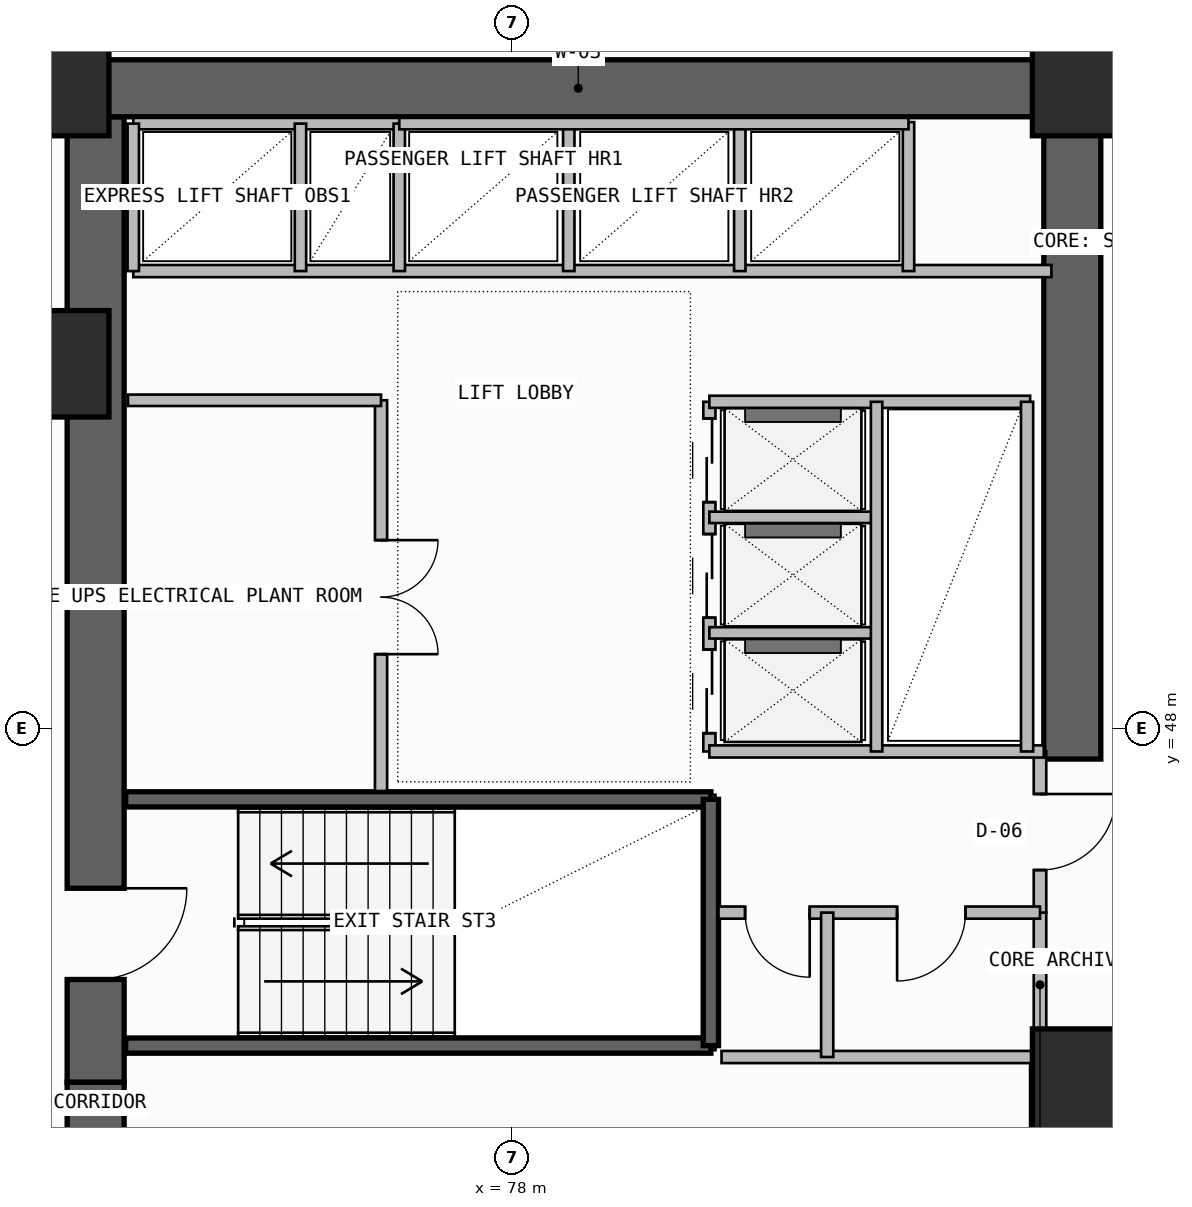
"""IFC4 building model, lengths in metres.
Left out: names, types, materials, properties, quantities, classifications, styles, units other than length and angle.
Written with IfcOpenShell. Run it as: python <this file> out.ifc"""

import sys

from ifc_helpers import new_model, si_unit, direction, frame, frame_2d, origin, origin_2d, place, context, subcontext, project, spatial, rectangle, extrude, element, fill, save


model = new_model("IFC4")
c1 = context("Model", 3, precision=1e-05, world=origin(), true_north=direction((0.0, 1.0)))
c2 = subcontext(c1, "Body", "Model", "MODEL_VIEW")
j1 = project(units=[si_unit("LENGTHUNIT", "METRE"), si_unit("PLANEANGLEUNIT", "RADIAN")], contexts=[c1])
p1 = place(None, origin())
s1 = spatial("IfcSite", under=j1, at=p1, CompositionType="ELEMENT")
p2 = place(p1, origin())
s2 = spatial("IfcBuilding", under=s1, at=p2, CompositionType="ELEMENT")
p3 = place(p2, frame((0.0, 0.0, 171.9)))
s3 = spatial("IfcBuildingStorey", under=s2, at=p3, CompositionType="ELEMENT", Elevation=171.9)
p4 = place(p3, frame((72.525, 35.5, -0.26), z_axis=(0.0, 0.0, 1.0), x_axis=(0.0, 1.0, 0.0)))
e1 = element("IfcWall", 1, at=p4, inside=s3, PredefinedType="SHEAR", context=c2, shape_type="SweptSolid", body=[
    extrude(rectangle(XDim=7.85, YDim=0.75, at=frame_2d((3.925, 0.0))), origin(), (0.0, 0.0, 1.0), 3.6),
])
p5 = place(p4, frame((1.45, 0.0, 0.26)))
e2 = element("IfcOpeningElement", 2, at=p5, cuts=e1, PredefinedType="OPENING", context=c2, shape_type="SweptSolid", body=[
    extrude(rectangle(XDim=1.2, YDim=2.2, at=frame_2d((0.6, 1.1))), frame((0.0, 0.385, 0.0), z_axis=(0.0, -1.0, 0.0), x_axis=(1.0, 0.0, 0.0)), (0.0, 0.0, 1.0), 0.77),
])
p6 = place(p3, frame((72.525, 43.35, -0.26), z_axis=(0.0, 0.0, 1.0), x_axis=(0.0, 1.0, 0.0)))
e3 = element("IfcWall", 3, at=p6, inside=s3, PredefinedType="SHEAR", context=c2, shape_type="SweptSolid", body=[
    extrude(rectangle(XDim=12.7, YDim=0.75, at=frame_2d((6.35, 0.0))), origin(), (0.0, 0.0, 1.0), 3.6),
])
p7 = place(p6, frame((1.35, 0.0, 0.26)))
e4 = element("IfcOpeningElement", 4, at=p7, cuts=e3, PredefinedType="OPENING", context=c2, shape_type="SweptSolid", body=[
    extrude(rectangle(XDim=1.2, YDim=2.2, at=frame_2d((0.6, 1.1))), frame((0.0, 0.385, 0.0), z_axis=(0.0, -1.0, 0.0), x_axis=(1.0, 0.0, 0.0)), (0.0, 0.0, 1.0), 0.77),
])
p8 = place(p3, frame((72.0, 56.425, -0.26), z_axis=(0.0, 0.0, 1.0), x_axis=(1.0, 0.0, 0.0)))
e5 = element("IfcWall", 5, at=p8, inside=s3, PredefinedType="SHEAR", context=c2, shape_type="SweptSolid", body=[
    extrude(rectangle(XDim=13.75, YDim=0.75, at=frame_2d((6.875, 0.0))), origin(), (0.0, 0.0, 1.0), 3.6),
])
p9 = place(p3, frame((85.375, 47.6, -0.26), z_axis=(0.0, 0.0, 1.0), x_axis=(0.0, 1.0, 0.0)))
e6 = element("IfcWall", 6, at=p9, inside=s3, PredefinedType="SHEAR", context=c2, shape_type="SweptSolid", body=[
    extrude(rectangle(XDim=8.45, YDim=0.75, at=frame_2d((4.225, 0.0))), origin(), (0.0, 0.0, 1.0), 3.6),
])
for number, where, z_axis, x_axis in (
    (7, (85.55, 43.35, 0.0), (0.0, 0.0, 1.0), (1.0, 0.0, 0.0)),
    (8, (72.0, 52.8, 0.0), (0.0, 0.0, 1.0), (1.0, 0.0, 0.0)),
    (9, (72.0, 56.5, 0.0), (0.0, 0.0, 1.0), (1.0, 0.0, 0.0)),
    (10, (85.55, 56.5, 0.0), (0.0, 0.0, 1.0), (1.0, 0.0, 0.0)),
):
    element("IfcColumn", number, at=place(p3, frame(where, z_axis=z_axis, x_axis=x_axis)), inside=s3, PredefinedType="COLUMN", context=c2, shape_type="SweptSolid", body=[
        extrude(rectangle(XDim=1.4, YDim=1.4, at=origin_2d()), origin(), (0.0, 0.0, 1.0), 3.6),
    ])
p10 = place(p3, frame((84.92, 38.85, 0.0), z_axis=(0.0, 0.0, 1.0), x_axis=(0.0, 1.0, 0.0)))
e11 = element("IfcWall", 11, at=p10, inside=s3, PredefinedType="SOLIDWALL", context=c2, shape_type="SweptSolid", body=[
    extrude(rectangle(XDim=4.83, YDim=0.2, at=frame_2d((2.415, 0.0))), origin(), (0.0, 0.0, 1.0), 3.34),
])
p11 = place(p10, frame((1.25, 0.0, 0.0)))
e12 = element("IfcOpeningElement", 12, at=p11, cuts=e11, PredefinedType="OPENING", context=c2, shape_type="SweptSolid", body=[
    extrude(rectangle(XDim=1.1, YDim=2.2, at=frame_2d((0.55, 1.1))), frame((0.0, 0.11, 0.0), z_axis=(0.0, -1.0, 0.0), x_axis=(1.0, 0.0, 0.0)), (0.0, 0.0, 1.0), 0.22),
])
for number, where, z_axis, x_axis in (
    (13, (72.92, 43.83, -0.26), (0.0, 0.0, 1.0), (1.0, 0.0, 0.0)),
    (14, (72.92, 47.07, -0.26), (0.0, 0.0, 1.0), (1.0, 0.0, 0.0)),
):
    element("IfcWall", number, at=place(p3, frame(where, z_axis=z_axis, x_axis=x_axis)), inside=s3, PredefinedType="SOLIDWALL", context=c2, shape_type="SweptSolid", body=[
        extrude(rectangle(XDim=7.7, YDim=0.2, at=frame_2d((3.85, 0.0))), origin(), (0.0, 0.0, 1.0), 3.6),
    ])
p12 = place(p3, frame((80.62, 43.83, -0.26), z_axis=(0.0, 0.0, 1.0), x_axis=(0.0, 1.0, 0.0)))
e15 = element("IfcWall", 15, at=p12, inside=s3, PredefinedType="SOLIDWALL", context=c2, shape_type="SweptSolid", body=[
    extrude(rectangle(XDim=3.24, YDim=0.2, at=frame_2d((1.62, 0.0))), origin(), (0.0, 0.0, 1.0), 3.6),
])
p13 = place(p3, frame((84.95, 43.68, 0.0), z_axis=(0.0, 0.0, 1.0), x_axis=(0.0, 1.0, 0.0)))
e16 = element("IfcWall", 16, at=p13, inside=s3, PredefinedType="PLUMBINGWALL", context=c2, shape_type="SweptSolid", body=[
    extrude(rectangle(XDim=1.9, YDim=0.165, at=frame_2d((0.95, 0.0))), origin(), (0.0, 0.0, 1.0), 3.34),
])
p14 = place(p3, frame((84.95, 45.58, 0.0), z_axis=(0.0, 0.0, 1.0), x_axis=(0.0, 1.0, 0.0)))
e17 = element("IfcWall", 17, at=p14, inside=s3, PredefinedType="PARTITIONING", context=c2, shape_type="SweptSolid", body=[
    extrude(rectangle(XDim=2.12, YDim=0.165, at=frame_2d((1.06, 0.0))), origin(), (0.0, 0.0, 1.0), 3.34),
])
p15 = place(p14, frame((0.56, 0.0, 0.0)))
e18 = element("IfcOpeningElement", 18, at=p15, cuts=e17, PredefinedType="OPENING", context=c2, shape_type="SweptSolid", body=[
    extrude(rectangle(XDim=1.0, YDim=2.2, at=frame_2d((0.5, 1.1))), frame((0.0, 0.093, 0.0), z_axis=(0.0, -1.0, 0.0), x_axis=(1.0, 0.0, 0.0)), (0.0, 0.0, 1.0), 0.185),
])
p16 = place(p3, frame((80.72, 45.58, 0.0), z_axis=(0.0, 0.0, 1.0), x_axis=(1.0, 0.0, 0.0)))
e19 = element("IfcWall", 19, at=p16, inside=s3, PredefinedType="PLUMBINGWALL", context=c2, shape_type="SweptSolid", body=[
    extrude(rectangle(XDim=4.23, YDim=0.16, at=frame_2d((2.115, 0.0))), origin(), (0.0, 0.0, 1.0), 3.34),
])
p17 = place(p16, frame((0.35, 0.0, 0.0)))
e20 = element("IfcOpeningElement", 20, at=p17, cuts=e19, PredefinedType="OPENING", context=c2, shape_type="SweptSolid", body=[
    extrude(rectangle(XDim=0.85, YDim=2.05, at=frame_2d((0.425, 1.025))), frame((0.0, 0.09, 0.0), z_axis=(0.0, -1.0, 0.0), x_axis=(1.0, 0.0, 0.0)), (0.0, 0.0, 1.0), 0.18),
])
p18 = place(p16, frame((2.35, 0.0, 0.0)))
e21 = element("IfcOpeningElement", 21, at=p18, cuts=e19, PredefinedType="OPENING", context=c2, shape_type="SweptSolid", body=[
    extrude(rectangle(XDim=0.9, YDim=2.1, at=frame_2d((0.45, 1.05))), frame((0.0, 0.09, 0.0), z_axis=(0.0, -1.0, 0.0), x_axis=(1.0, 0.0, 0.0)), (0.0, 0.0, 1.0), 0.18),
])
p19 = place(p3, frame((80.76, 43.68, 0.0), z_axis=(0.0, 0.0, 1.0), x_axis=(1.0, 0.0, 0.0)))
e22 = element("IfcWall", 22, at=p19, inside=s3, PredefinedType="PLUMBINGWALL", context=c2, shape_type="SweptSolid", body=[
    extrude(rectangle(XDim=4.19, YDim=0.16, at=frame_2d((2.095, 0.0))), origin(), (0.0, 0.0, 1.0), 3.34),
])
p20 = place(p3, frame((82.15, 43.68, 0.0), z_axis=(0.0, 0.0, 1.0), x_axis=(0.0, 1.0, 0.0)))
e23 = element("IfcWall", 23, at=p20, inside=s3, PredefinedType="PLUMBINGWALL", context=c2, shape_type="SweptSolid", body=[
    extrude(rectangle(XDim=1.9, YDim=0.16, at=frame_2d((0.95, 0.0))), origin(), (0.0, 0.0, 1.0), 3.34),
])
p21 = place(p3, frame((76.28, 47.18, 0.0), z_axis=(0.0, 0.0, 1.0), x_axis=(0.0, 1.0, 0.0)))
e24 = element("IfcWall", 24, at=p21, inside=s3, PredefinedType="SOLIDWALL", context=c2, shape_type="SweptSolid", body=[
    extrude(rectangle(XDim=5.14, YDim=0.16, at=frame_2d((2.57, 0.0))), origin(), (0.0, 0.0, 1.0), 3.34),
])
p22 = place(p21, frame((1.8, 0.0, 0.0)))
e25 = element("IfcOpeningElement", 25, at=p22, cuts=e24, PredefinedType="OPENING", context=c2, shape_type="SweptSolid", body=[
    extrude(rectangle(XDim=1.5, YDim=2.25, at=frame_2d((0.75, 1.125))), frame((0.0, 0.09, 0.0), z_axis=(0.0, -1.0, 0.0), x_axis=(1.0, 0.0, 0.0)), (0.0, 0.0, 1.0), 0.18),
])
p23 = place(p3, frame((72.95, 52.32, 0.0), z_axis=(0.0, 0.0, 1.0), x_axis=(1.0, 0.0, 0.0)))
e26 = element("IfcWall", 26, at=p23, inside=s3, PredefinedType="SOLIDWALL", context=c2, shape_type="SweptSolid", body=[
    extrude(rectangle(XDim=3.33, YDim=0.15, at=frame_2d((1.665, 0.0))), origin(), (0.0, 0.0, 1.0), 3.34),
])
p24 = place(p3, frame((80.6, 47.7, 0.0), z_axis=(0.0, 0.0, 1.0), x_axis=(0.0, 1.0, 0.0)))
e27 = element("IfcWall", 27, at=p24, inside=s3, PredefinedType="SOLIDWALL", context=c2, shape_type="SweptSolid", body=[
    extrude(rectangle(XDim=4.6, YDim=0.16, at=frame_2d((2.3, 0.0))), origin(), (0.0, 0.0, 1.0), 3.34),
])
p25 = place(p24, frame((0.24, 0.0, 0.0)))
e28 = element("IfcOpeningElement", 28, at=p25, cuts=e27, PredefinedType="OPENING", context=c2, shape_type="SweptSolid", body=[
    extrude(rectangle(XDim=1.1, YDim=2.25, at=frame_2d((0.55, 1.125))), frame((0.0, 0.09, 0.0), z_axis=(0.0, -1.0, 0.0), x_axis=(1.0, 0.0, 0.0)), (0.0, 0.0, 1.0), 0.18),
])
p26 = place(p24, frame((1.76, 0.0, 0.0)))
e29 = element("IfcOpeningElement", 29, at=p26, cuts=e27, PredefinedType="OPENING", context=c2, shape_type="SweptSolid", body=[
    extrude(rectangle(XDim=1.1, YDim=2.25, at=frame_2d((0.55, 1.125))), frame((0.0, 0.09, 0.0), z_axis=(0.0, -1.0, 0.0), x_axis=(1.0, 0.0, 0.0)), (0.0, 0.0, 1.0), 0.18),
])
p27 = place(p24, frame((3.28, 0.0, 0.0)))
e30 = element("IfcOpeningElement", 30, at=p27, cuts=e27, PredefinedType="OPENING", context=c2, shape_type="SweptSolid", body=[
    extrude(rectangle(XDim=1.1, YDim=2.25, at=frame_2d((0.55, 1.125))), frame((0.0, 0.09, 0.0), z_axis=(0.0, -1.0, 0.0), x_axis=(1.0, 0.0, 0.0)), (0.0, 0.0, 1.0), 0.18),
])
p28 = place(p3, frame((80.6, 47.7, 0.0), z_axis=(0.0, 0.0, 1.0), x_axis=(1.0, 0.0, 0.0)))
e31 = element("IfcWall", 31, at=p28, inside=s3, PredefinedType="SOLIDWALL", context=c2, shape_type="SweptSolid", body=[
    extrude(rectangle(XDim=4.4, YDim=0.16, at=frame_2d((2.2, 0.0))), origin(), (0.0, 0.0, 1.0), 3.34),
])
p29 = place(p3, frame((80.6, 52.3, 0.0), z_axis=(0.0, 0.0, 1.0), x_axis=(1.0, 0.0, 0.0)))
e32 = element("IfcWall", 32, at=p29, inside=s3, PredefinedType="SOLIDWALL", context=c2, shape_type="SweptSolid", body=[
    extrude(rectangle(XDim=4.22, YDim=0.16, at=frame_2d((2.11, 0.0))), origin(), (0.0, 0.0, 1.0), 3.34),
])
for number, where, z_axis, x_axis in (
    (33, (80.6, 49.26, 0.0), (0.0, 0.0, 1.0), (1.0, 0.0, 0.0)),
    (34, (80.6, 50.78, 0.0), (0.0, 0.0, 1.0), (1.0, 0.0, 0.0)),
):
    element("IfcWall", number, at=place(p3, frame(where, z_axis=z_axis, x_axis=x_axis)), inside=s3, PredefinedType="PLUMBINGWALL", context=c2, shape_type="SweptSolid", body=[
        extrude(rectangle(XDim=2.2, YDim=0.15, at=frame_2d((1.1, 0.0))), origin(), (0.0, 0.0, 1.0), 3.34),
    ])
p30 = place(p3, frame((82.8, 47.7, 0.0), z_axis=(0.0, 0.0, 1.0), x_axis=(0.0, 1.0, 0.0)))
e35 = element("IfcWall", 35, at=p30, inside=s3, PredefinedType="PLUMBINGWALL", context=c2, shape_type="SweptSolid", body=[
    extrude(rectangle(XDim=4.6, YDim=0.15, at=frame_2d((2.3, 0.0))), origin(), (0.0, 0.0, 1.0), 3.34),
])
p31 = place(p3, frame((84.78, 47.7, 0.0), z_axis=(0.0, 0.0, 1.0), x_axis=(0.0, 1.0, 0.0)))
e36 = element("IfcWall", 36, at=p31, inside=s3, PredefinedType="SOLIDWALL", context=c2, shape_type="SweptSolid", body=[
    extrude(rectangle(XDim=4.6, YDim=0.16, at=frame_2d((2.3, 0.0))), origin(), (0.0, 0.0, 1.0), 3.34),
])
p32 = place(p3, frame((73.02, 54.02, 0.0), z_axis=(0.0, 0.0, 1.0), x_axis=(1.0, 0.0, 0.0)))
e37 = element("IfcWall", 37, at=p32, inside=s3, PredefinedType="SOLIDWALL", context=c2, shape_type="SweptSolid", body=[
    extrude(rectangle(XDim=12.08, YDim=0.16, at=frame_2d((6.04, 0.0))), origin(), (0.0, 0.0, 1.0), 3.34),
])
p33 = place(p3, frame((73.02, 55.96, 0.0), z_axis=(0.0, 0.0, 1.0), x_axis=(1.0, 0.0, 0.0)))
e38 = element("IfcWall", 38, at=p33, inside=s3, PredefinedType="SOLIDWALL", context=c2, shape_type="SweptSolid", body=[
    extrude(rectangle(XDim=3.5, YDim=0.15, at=frame_2d((1.75, 0.0))), origin(), (0.0, 0.0, 1.0), 3.34),
])
p34 = place(p3, frame((73.02, 54.02, 0.0), z_axis=(0.0, 0.0, 1.0), x_axis=(0.0, 1.0, 0.0)))
e39 = element("IfcWall", 39, at=p34, inside=s3, PredefinedType="PLUMBINGWALL", context=c2, shape_type="SweptSolid", body=[
    extrude(rectangle(XDim=1.94, YDim=0.15, at=frame_2d((0.97, 0.0))), origin(), (0.0, 0.0, 1.0), 3.34),
])
p35 = place(p3, frame((76.52, 54.02, 0.0), z_axis=(0.0, 0.0, 1.0), x_axis=(0.0, 1.0, 0.0)))
e40 = element("IfcWall", 40, at=p35, inside=s3, PredefinedType="SOLIDWALL", context=c2, shape_type="SweptSolid", body=[
    extrude(rectangle(XDim=1.94, YDim=0.15, at=frame_2d((0.97, 0.0))), origin(), (0.0, 0.0, 1.0), 3.34),
])
p36 = place(p3, frame((75.22, 54.02, 0.0), z_axis=(0.0, 0.0, 1.0), x_axis=(0.0, 1.0, 0.0)))
e41 = element("IfcWall", 41, at=p36, inside=s3, PredefinedType="PLUMBINGWALL", context=c2, shape_type="SweptSolid", body=[
    extrude(rectangle(XDim=1.94, YDim=0.15, at=frame_2d((0.97, 0.0))), origin(), (0.0, 0.0, 1.0), 3.34),
])
for number, where, z_axis, x_axis in (
    (42, (78.75, 54.02, 0.0), (0.0, 0.0, 1.0), (0.0, 1.0, 0.0)),
    (43, (81.0, 54.02, 0.0), (0.0, 0.0, 1.0), (0.0, 1.0, 0.0)),
):
    element("IfcWall", number, at=place(p3, frame(where, z_axis=z_axis, x_axis=x_axis)), inside=s3, PredefinedType="PLUMBINGWALL", context=c2, shape_type="SweptSolid", body=[
        extrude(rectangle(XDim=1.96, YDim=0.15, at=frame_2d((0.98, 0.0))), origin(), (0.0, 0.0, 1.0), 3.34),
    ])
p37 = place(p3, frame((83.22, 54.02, 0.0), z_axis=(0.0, 0.0, 1.0), x_axis=(0.0, 1.0, 0.0)))
e44 = element("IfcWall", 44, at=p37, inside=s3, PredefinedType="SOLIDWALL", context=c2, shape_type="SweptSolid", body=[
    extrude(rectangle(XDim=1.96, YDim=0.15, at=frame_2d((0.98, 0.0))), origin(), (0.0, 0.0, 1.0), 3.34),
])
p38 = place(p3, frame((76.52, 55.96, 0.0), z_axis=(0.0, 0.0, 1.0), x_axis=(1.0, 0.0, 0.0)))
e45 = element("IfcWall", 45, at=p38, inside=s3, PredefinedType="SOLIDWALL", context=c2, shape_type="SweptSolid", body=[
    extrude(rectangle(XDim=6.7, YDim=0.15, at=frame_2d((3.35, 0.0))), origin(), (0.0, 0.0, 1.0), 3.34),
])
p39 = place(p7, frame((1.2, 0.0, 0.0), z_axis=(0.0, 0.0, 1.0), x_axis=(-1.0, 0.0, 0.0)))
e46 = element("IfcDoor", 46, at=p39, inside=s3, OperationType="SINGLE_SWING_LEFT", PredefinedType="USERDEFINED", context=c2, shape_type="SweptSolid", body=[
    extrude(rectangle(XDim=1.2, YDim=2.2, at=frame_2d((0.6, 1.1))), frame((0.0, 0.025, 0.0), z_axis=(0.0, -1.0, 0.0), x_axis=(1.0, 0.0, 0.0)), (0.0, 0.0, 1.0), 0.05),
])
fill(e4, e46)
p40 = place(p15, frame((1.0, 0.0, 0.0), z_axis=(0.0, 0.0, 1.0), x_axis=(-1.0, 0.0, 0.0)))
e47 = element("IfcDoor", 47, at=p40, inside=s3, OperationType="SINGLE_SWING_LEFT", PredefinedType="DOOR", context=c2, shape_type="SweptSolid", body=[
    extrude(rectangle(XDim=1.0, YDim=2.2, at=frame_2d((0.5, 1.1))), frame((0.0, 0.025, 0.0), z_axis=(0.0, -1.0, 0.0), x_axis=(1.0, 0.0, 0.0)), (0.0, 0.0, 1.0), 0.05),
])
fill(e18, e47)
p41 = place(p17, frame((0.85, 0.0, 0.0), z_axis=(0.0, 0.0, 1.0), x_axis=(-1.0, 0.0, 0.0)))
e48 = element("IfcDoor", 48, at=p41, inside=s3, OperationType="SINGLE_SWING_LEFT", PredefinedType="DOOR", context=c2, shape_type="SweptSolid", body=[
    extrude(rectangle(XDim=0.85, YDim=2.05, at=frame_2d((0.425, 1.025))), frame((0.0, 0.025, 0.0), z_axis=(0.0, -1.0, 0.0), x_axis=(1.0, 0.0, 0.0)), (0.0, 0.0, 1.0), 0.05),
])
fill(e20, e48)
p42 = place(p18, frame((0.9, 0.0, 0.0), z_axis=(0.0, 0.0, 1.0), x_axis=(-1.0, 0.0, 0.0)))
e49 = element("IfcDoor", 49, at=p42, inside=s3, OperationType="SINGLE_SWING_RIGHT", PredefinedType="DOOR", context=c2, shape_type="SweptSolid", body=[
    extrude(rectangle(XDim=0.9, YDim=2.1, at=frame_2d((0.45, 1.05))), frame((0.0, 0.025, 0.0), z_axis=(0.0, -1.0, 0.0), x_axis=(1.0, 0.0, 0.0)), (0.0, 0.0, 1.0), 0.05),
])
fill(e21, e49)
p43 = place(p22, frame((1.5, 0.0, 0.0), z_axis=(0.0, 0.0, 1.0), x_axis=(-1.0, 0.0, 0.0)))
e50 = element("IfcDoor", 50, at=p43, inside=s3, OperationType="DOUBLE_DOOR_SINGLE_SWING", PredefinedType="DOOR", context=c2, shape_type="SweptSolid", body=[
    extrude(rectangle(XDim=1.5, YDim=2.25, at=frame_2d((0.75, 1.125))), frame((0.0, 0.025, 0.0), z_axis=(0.0, -1.0, 0.0), x_axis=(1.0, 0.0, 0.0)), (0.0, 0.0, 1.0), 0.05),
])
fill(e25, e50)
p44 = place(p25, frame((1.1, 0.0, 0.0), z_axis=(0.0, 0.0, 1.0), x_axis=(-1.0, 0.0, 0.0)))
e51 = element("IfcDoor", 51, at=p44, inside=s3, OperationType="DOUBLE_DOOR_SLIDING", PredefinedType="DOOR", context=c2, shape_type="SweptSolid", body=[
    extrude(rectangle(XDim=1.1, YDim=2.25, at=frame_2d((0.55, 1.125))), frame((0.0, 0.025, 0.0), z_axis=(0.0, -1.0, 0.0), x_axis=(1.0, 0.0, 0.0)), (0.0, 0.0, 1.0), 0.05),
])
fill(e28, e51)
p45 = place(p26, frame((1.1, 0.0, 0.0), z_axis=(0.0, 0.0, 1.0), x_axis=(-1.0, 0.0, 0.0)))
e52 = element("IfcDoor", 52, at=p45, inside=s3, OperationType="DOUBLE_DOOR_SLIDING", PredefinedType="DOOR", context=c2, shape_type="SweptSolid", body=[
    extrude(rectangle(XDim=1.1, YDim=2.25, at=frame_2d((0.55, 1.125))), frame((0.0, 0.025, 0.0), z_axis=(0.0, -1.0, 0.0), x_axis=(1.0, 0.0, 0.0)), (0.0, 0.0, 1.0), 0.05),
])
fill(e29, e52)
p46 = place(p27, frame((1.1, 0.0, 0.0), z_axis=(0.0, 0.0, 1.0), x_axis=(-1.0, 0.0, 0.0)))
e53 = element("IfcDoor", 53, at=p46, inside=s3, OperationType="DOUBLE_DOOR_SLIDING", PredefinedType="DOOR", context=c2, shape_type="SweptSolid", body=[
    extrude(rectangle(XDim=1.1, YDim=2.25, at=frame_2d((0.55, 1.125))), frame((0.0, 0.025, 0.0), z_axis=(0.0, -1.0, 0.0), x_axis=(1.0, 0.0, 0.0)), (0.0, 0.0, 1.0), 0.05),
])
fill(e30, e53)
save(model, sys.argv[1])
